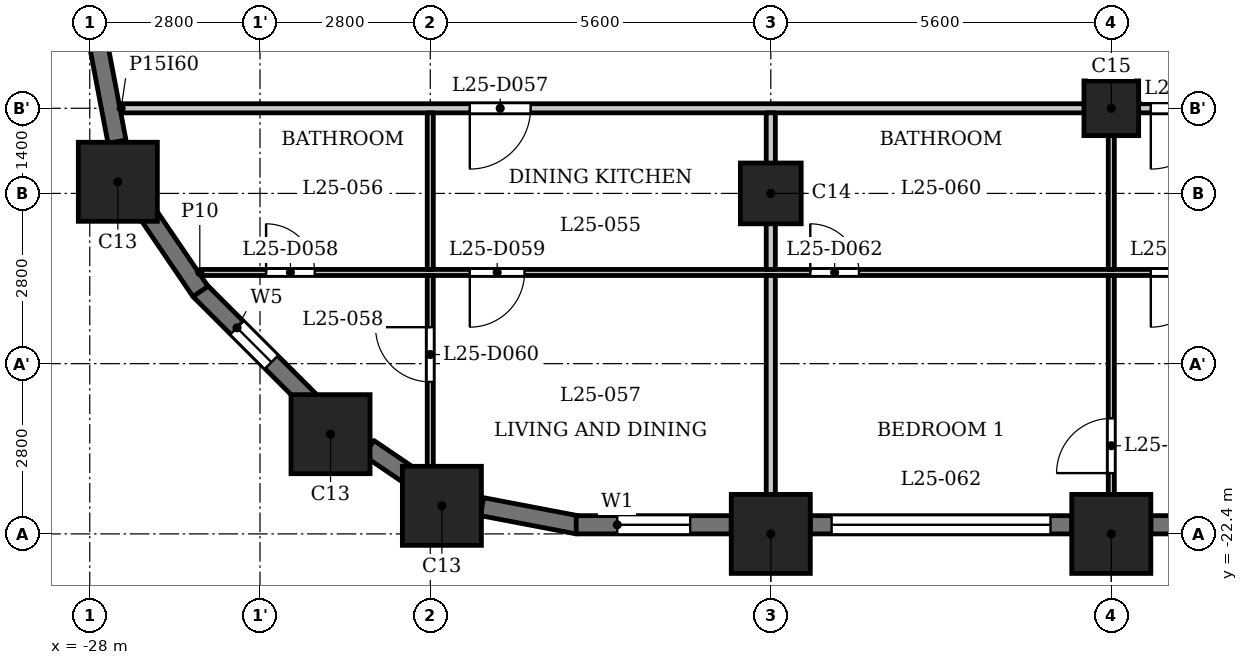
"""IFC4 building model, lengths in metres.
Left out: names, types, materials, properties, quantities, classifications, styles, units other than length and angle.
Written with IfcOpenShell. Run it as: python <this file> out.ifc"""

import sys

from ifc_helpers import new_model, si_unit, direction, frame, frame_2d, origin, origin_2d, place, context, subcontext, project, spatial, rectangle, extrude, element, fill, save


model = new_model("IFC4")
c1 = context("Model", 3, precision=1e-05, world=origin(), true_north=direction((0.0, 1.0)))
c2 = subcontext(c1, "Body", "Model", "MODEL_VIEW")
j1 = project(units=[si_unit("LENGTHUNIT", "METRE"), si_unit("PLANEANGLEUNIT", "RADIAN")], contexts=[c1])
p1 = place(None, origin())
s1 = spatial("IfcSite", under=j1, at=p1, CompositionType="ELEMENT")
p2 = place(p1, origin())
s2 = spatial("IfcBuilding", under=s1, at=p2, CompositionType="ELEMENT")
p3 = place(p2, frame((0.0, 0.0, 100.8)))
s3 = spatial("IfcBuildingStorey", under=s2, at=p3, CompositionType="ELEMENT", Elevation=100.8)
for number, where, z_axis, x_axis in (
    (1, (-22.209, -21.938, 0.0), (0.0, 0.0, 1.0), (1.0, 0.0, 0.0)),
    (2, (-16.8, -22.4, 0.0), (0.0, 0.0, 1.0), (1.0, 0.0, 0.0)),
    (3, (-11.2, -22.4, 0.0), (0.0, 0.0, 1.0), (1.0, 0.0, 0.0)),
    (4, (-27.538, -16.609, 0.0), (0.0, 0.0, 1.0), (1.0, 0.0, 0.0)),
    (5, (-24.04, -20.76, 0.0), (0.0, 0.0, 1.0), (1.0, 0.0, 0.0)),
):
    element("IfcColumn", number, at=place(p3, frame(where, z_axis=z_axis, x_axis=x_axis)), inside=s3, PredefinedType="COLUMN", context=c2, shape_type="SweptSolid", body=[
        extrude(rectangle(XDim=1.3, YDim=1.3, at=origin_2d()), origin(), (0.0, 0.0, 1.0), 3.5),
    ])
p4 = place(p3, frame((-16.8, -16.8, 0.0), z_axis=(0.0, 0.0, 1.0), x_axis=(1.0, 0.0, 0.0)))
e6 = element("IfcColumn", 6, at=p4, inside=s3, PredefinedType="COLUMN", context=c2, shape_type="SweptSolid", body=[
    extrude(rectangle(XDim=1.0, YDim=1.0, at=origin_2d()), origin(), (0.0, 0.0, 1.0), 3.5),
])
p5 = place(p3, frame((-11.2, -15.4, 0.0), z_axis=(0.0, 0.0, 1.0), x_axis=(1.0, 0.0, 0.0)))
e7 = element("IfcColumn", 7, at=p5, inside=s3, PredefinedType="COLUMN", context=c2, shape_type="SweptSolid", body=[
    extrude(rectangle(XDim=0.9, YDim=0.9, at=origin_2d()), origin(), (0.0, 0.0, 1.0), 3.5),
])
p6 = place(p3, frame((-26.197, -18.391, 0.0), z_axis=(0.0, 0.0, 1.0), x_axis=(0.707058908279, -0.707154650853, 0.0)))
e8 = element("IfcWall", 8, at=p6, inside=s3, PredefinedType="SOLIDWALL", context=c2, shape_type="SweptSolid", body=[
    extrude(rectangle(XDim=2.55, YDim=0.3, at=frame_2d((1.275, 0.0))), origin(), (0.0, 0.0, 1.0), 2.4),
])
p7 = place(p6, frame((0.875, 0.0, 0.6)))
e9 = element("IfcOpeningElement", 9, at=p7, cuts=e8, PredefinedType="OPENING", context=c2, shape_type="SweptSolid", body=[
    extrude(rectangle(XDim=0.8, YDim=1.55, at=frame_2d((0.4, 0.775))), frame((0.0, 0.16, 0.0), z_axis=(0.0, -1.0, 0.0), x_axis=(1.0, 0.0, 0.0)), (0.0, 0.0, 1.0), 0.32),
])
p8 = place(p3, frame((-23.41, -20.989, 0.0), z_axis=(0.0, 0.0, 1.0), x_axis=(0.827050703543, -0.562127328787, 0.0)))
e10 = element("IfcWall", 10, at=p8, inside=s3, PredefinedType="SOLIDWALL", context=c2, shape_type="SweptSolid", body=[
    extrude(rectangle(XDim=0.877, YDim=0.3, at=frame_2d((0.438, 0.0))), origin(), (0.0, 0.0, 1.0), 3.2),
])
p9 = place(p3, frame((-21.55, -21.952, 0.0), z_axis=(0.0, 0.0, 1.0), x_axis=(0.982278644094, -0.187426426519, 0.0)))
e11 = element("IfcWall", 11, at=p9, inside=s3, PredefinedType="SOLIDWALL", context=c2, shape_type="SweptSolid", body=[
    extrude(rectangle(XDim=1.606, YDim=0.3, at=frame_2d((0.803, 0.0))), origin(), (0.0, 0.0, 1.0), 2.4),
])
p10 = place(p3, frame((-20.0, -22.25, 0.0), z_axis=(0.0, 0.0, 1.0), x_axis=(1.0, 0.0, 0.0)))
e12 = element("IfcWall", 12, at=p10, inside=s3, PredefinedType="SOLIDWALL", context=c2, shape_type="SweptSolid", body=[
    extrude(rectangle(XDim=2.55, YDim=0.3, at=frame_2d((1.275, 0.0))), origin(), (0.0, 0.0, 1.0), 2.4),
])
p11 = place(p10, frame((0.675, 0.0, 0.6)))
e13 = element("IfcOpeningElement", 13, at=p11, cuts=e12, PredefinedType="OPENING", context=c2, shape_type="SweptSolid", body=[
    extrude(rectangle(XDim=1.2, YDim=1.55, at=frame_2d((0.6, 0.775))), frame((0.0, 0.16, 0.0), z_axis=(0.0, -1.0, 0.0), x_axis=(1.0, 0.0, 0.0)), (0.0, 0.0, 1.0), 0.32),
])
p12 = place(p3, frame((-16.15, -22.25, 0.0), z_axis=(0.0, 0.0, 1.0), x_axis=(1.0, 0.0, 0.0)))
e14 = element("IfcWall", 14, at=p12, inside=s3, PredefinedType="SOLIDWALL", context=c2, shape_type="SweptSolid", body=[
    extrude(rectangle(XDim=4.3, YDim=0.3, at=frame_2d((2.15, 0.0))), origin(), (0.0, 0.0, 1.0), 2.4),
])
p13 = place(p12, frame((0.35, 0.0, 1.2)))
e15 = element("IfcOpeningElement", 15, at=p13, cuts=e14, PredefinedType="OPENING", context=c2, shape_type="SweptSolid", body=[
    extrude(rectangle(XDim=3.6, YDim=0.95, at=frame_2d((1.8, 0.475))), frame((0.0, 0.16, 0.0), z_axis=(0.0, -1.0, 0.0), x_axis=(1.0, 0.0, 0.0)), (0.0, 0.0, 1.0), 0.32),
])
p14 = place(p3, frame((-10.55, -22.25, 0.0), z_axis=(0.0, 0.0, 1.0), x_axis=(1.0, 0.0, 0.0)))
e16 = element("IfcWall", 16, at=p14, inside=s3, PredefinedType="SOLIDWALL", context=c2, shape_type="SweptSolid", body=[
    extrude(rectangle(XDim=4.3, YDim=0.3, at=frame_2d((2.15, 0.0))), origin(), (0.0, 0.0, 1.0), 2.4),
])
p15 = place(p14, frame((0.35, 0.0, 1.2)))
e17 = element("IfcOpeningElement", 17, at=p15, cuts=e16, PredefinedType="OPENING", context=c2, shape_type="SweptSolid", body=[
    extrude(rectangle(XDim=3.6, YDim=0.95, at=frame_2d((1.8, 0.475))), frame((0.0, 0.16, 0.0), z_axis=(0.0, -1.0, 0.0), x_axis=(1.0, 0.0, 0.0)), (0.0, 0.0, 1.0), 0.32),
])
for number, where, z_axis, x_axis in (
    (18, (-27.853, -14.372, 0.0), (0.0, 0.0, 1.0), (0.187, -0.982, 0.0)),
    (19, (-27.082, -17.084, 0.0), (0.0, 0.0, 1.0), (0.562, -0.827, 0.0)),
):
    element("IfcWall", number, at=place(p3, frame(where, z_axis=z_axis, x_axis=x_axis)), inside=s3, PredefinedType="SOLIDWALL", context=c2, shape_type="SweptSolid", body=[
        extrude(rectangle(XDim=1.606, YDim=0.3, at=frame_2d((0.803, 0.0))), origin(), (0.0, 0.0, 1.0), 2.4),
    ])
p16 = place(p3, frame((-26.19, -18.1, 0.0), z_axis=(0.0, 0.0, 1.0), x_axis=(1.0, 0.0, 0.0)))
e20 = element("IfcWall", 20, at=p16, inside=s3, PredefinedType="PARTITIONING", context=c2, shape_type="SweptSolid", body=[
    extrude(rectangle(XDim=52.63, YDim=0.1, at=frame_2d((26.315, 0.0))), origin(), (0.0, 0.0, 1.0), 3.2),
])
p17 = place(p16, frame((1.09, 0.0, 0.0)))
e21 = element("IfcOpeningElement", 21, at=p17, cuts=e20, PredefinedType="OPENING", context=c2, shape_type="SweptSolid", body=[
    extrude(rectangle(XDim=0.8, YDim=2.1, at=frame_2d((0.4, 1.05))), frame((0.0, 0.06, 0.0), z_axis=(0.0, -1.0, 0.0), x_axis=(1.0, 0.0, 0.0)), (0.0, 0.0, 1.0), 0.12),
])
p18 = place(p16, frame((4.44, 0.0, 0.0)))
e22 = element("IfcOpeningElement", 22, at=p18, cuts=e20, PredefinedType="OPENING", context=c2, shape_type="SweptSolid", body=[
    extrude(rectangle(XDim=0.9, YDim=2.1, at=frame_2d((0.45, 1.05))), frame((0.0, 0.06, 0.0), z_axis=(0.0, -1.0, 0.0), x_axis=(1.0, 0.0, 0.0)), (0.0, 0.0, 1.0), 0.12),
])
p19 = place(p16, frame((10.04, 0.0, 0.0)))
e23 = element("IfcOpeningElement", 23, at=p19, cuts=e20, PredefinedType="OPENING", context=c2, shape_type="SweptSolid", body=[
    extrude(rectangle(XDim=0.8, YDim=2.1, at=frame_2d((0.4, 1.05))), frame((0.0, 0.06, 0.0), z_axis=(0.0, -1.0, 0.0), x_axis=(1.0, 0.0, 0.0)), (0.0, 0.0, 1.0), 0.12),
])
p20 = place(p16, frame((15.64, 0.0, 0.0)))
e24 = element("IfcOpeningElement", 24, at=p20, cuts=e20, PredefinedType="OPENING", context=c2, shape_type="SweptSolid", body=[
    extrude(rectangle(XDim=0.9, YDim=2.1, at=frame_2d((0.45, 1.05))), frame((0.0, 0.06, 0.0), z_axis=(0.0, -1.0, 0.0), x_axis=(1.0, 0.0, 0.0)), (0.0, 0.0, 1.0), 0.12),
])
p21 = place(p16, frame((24.74, 0.0, 0.0)))
e25 = element("IfcOpeningElement", 25, at=p21, cuts=e20, PredefinedType="OPENING", context=c2, shape_type="SweptSolid", body=[
    extrude(rectangle(XDim=0.8, YDim=2.1, at=frame_2d((0.4, 1.05))), frame((0.0, 0.06, 0.0), z_axis=(0.0, -1.0, 0.0), x_axis=(1.0, 0.0, 0.0)), (0.0, 0.0, 1.0), 0.12),
])
p22 = place(p16, frame((21.24, 0.0, 0.0)))
e26 = element("IfcOpeningElement", 26, at=p22, cuts=e20, PredefinedType="OPENING", context=c2, shape_type="SweptSolid", body=[
    extrude(rectangle(XDim=0.9, YDim=2.1, at=frame_2d((0.45, 1.05))), frame((0.0, 0.06, 0.0), z_axis=(0.0, -1.0, 0.0), x_axis=(1.0, 0.0, 0.0)), (0.0, 0.0, 1.0), 0.12),
])
p23 = place(p16, frame((35.94, 0.0, 0.0)))
e27 = element("IfcOpeningElement", 27, at=p23, cuts=e20, PredefinedType="OPENING", context=c2, shape_type="SweptSolid", body=[
    extrude(rectangle(XDim=0.8, YDim=2.1, at=frame_2d((0.4, 1.05))), frame((0.0, 0.06, 0.0), z_axis=(0.0, -1.0, 0.0), x_axis=(1.0, 0.0, 0.0)), (0.0, 0.0, 1.0), 0.12),
])
p24 = place(p16, frame((33.19, 0.0, 0.0)))
e28 = element("IfcOpeningElement", 28, at=p24, cuts=e20, PredefinedType="OPENING", context=c2, shape_type="SweptSolid", body=[
    extrude(rectangle(XDim=0.9, YDim=2.1, at=frame_2d((0.45, 1.05))), frame((0.0, 0.06, 0.0), z_axis=(0.0, -1.0, 0.0), x_axis=(1.0, 0.0, 0.0)), (0.0, 0.0, 1.0), 0.12),
])
p25 = place(p16, frame((27.59, 0.0, 0.0)))
e29 = element("IfcOpeningElement", 29, at=p25, cuts=e20, PredefinedType="OPENING", context=c2, shape_type="SweptSolid", body=[
    extrude(rectangle(XDim=0.9, YDim=2.1, at=frame_2d((0.45, 1.05))), frame((0.0, 0.06, 0.0), z_axis=(0.0, -1.0, 0.0), x_axis=(1.0, 0.0, 0.0)), (0.0, 0.0, 1.0), 0.12),
])
p26 = place(p16, frame((29.64, 0.0, 0.0)))
e30 = element("IfcOpeningElement", 30, at=p26, cuts=e20, PredefinedType="OPENING", context=c2, shape_type="SweptSolid", body=[
    extrude(rectangle(XDim=0.9, YDim=2.1, at=frame_2d((0.45, 1.05))), frame((0.0, 0.06, 0.0), z_axis=(0.0, -1.0, 0.0), x_axis=(1.0, 0.0, 0.0)), (0.0, 0.0, 1.0), 0.12),
])
p27 = place(p16, frame((41.54, 0.0, 0.0)))
e31 = element("IfcOpeningElement", 31, at=p27, cuts=e20, PredefinedType="OPENING", context=c2, shape_type="SweptSolid", body=[
    extrude(rectangle(XDim=0.8, YDim=2.1, at=frame_2d((0.4, 1.05))), frame((0.0, 0.06, 0.0), z_axis=(0.0, -1.0, 0.0), x_axis=(1.0, 0.0, 0.0)), (0.0, 0.0, 1.0), 0.12),
])
p28 = place(p16, frame((38.54, 0.0, 0.0)))
e32 = element("IfcOpeningElement", 32, at=p28, cuts=e20, PredefinedType="OPENING", context=c2, shape_type="SweptSolid", body=[
    extrude(rectangle(XDim=0.9, YDim=2.1, at=frame_2d((0.45, 1.05))), frame((0.0, 0.06, 0.0), z_axis=(0.0, -1.0, 0.0), x_axis=(1.0, 0.0, 0.0)), (0.0, 0.0, 1.0), 0.12),
])
p29 = place(p16, frame((49.204, 0.0, 0.0)))
e33 = element("IfcOpeningElement", 33, at=p29, cuts=e20, PredefinedType="OPENING", context=c2, shape_type="SweptSolid", body=[
    extrude(rectangle(XDim=0.8, YDim=2.1, at=frame_2d((0.4, 1.05))), frame((0.0, 0.06, 0.0), z_axis=(0.0, -1.0, 0.0), x_axis=(1.0, 0.0, 0.0)), (0.0, 0.0, 1.0), 0.12),
])
p30 = place(p16, frame((43.64, 0.0, 0.0)))
e34 = element("IfcOpeningElement", 34, at=p30, cuts=e20, PredefinedType="OPENING", context=c2, shape_type="SweptSolid", body=[
    extrude(rectangle(XDim=0.9, YDim=2.1, at=frame_2d((0.45, 1.05))), frame((0.0, 0.06, 0.0), z_axis=(0.0, -1.0, 0.0), x_axis=(1.0, 0.0, 0.0)), (0.0, 0.0, 1.0), 0.12),
])
p31 = place(p3, frame((-27.484, -15.4, 0.0), z_axis=(0.0, 0.0, 1.0), x_axis=(1.0, 0.0, 0.0)))
e35 = element("IfcWall", 35, at=p31, inside=s3, PredefinedType="PARTITIONING", context=c2, shape_type="SweptSolid", body=[
    extrude(rectangle(XDim=54.968, YDim=0.15, at=frame_2d((27.484, 0.0))), origin(), (0.0, 0.0, 1.0), 3.2),
])
p32 = place(p31, frame((5.734, 0.0, 0.0)))
e36 = element("IfcOpeningElement", 36, at=p32, cuts=e35, PredefinedType="OPENING", context=c2, shape_type="SweptSolid", body=[
    extrude(rectangle(XDim=1.0, YDim=2.1, at=frame_2d((0.5, 1.05))), frame((0.0, 0.085, 0.0), z_axis=(0.0, -1.0, 0.0), x_axis=(1.0, 0.0, 0.0)), (0.0, 0.0, 1.0), 0.17),
])
p33 = place(p31, frame((16.934, 0.0, 0.0)))
e37 = element("IfcOpeningElement", 37, at=p33, cuts=e35, PredefinedType="OPENING", context=c2, shape_type="SweptSolid", body=[
    extrude(rectangle(XDim=1.0, YDim=2.1, at=frame_2d((0.5, 1.05))), frame((0.0, 0.085, 0.0), z_axis=(0.0, -1.0, 0.0), x_axis=(1.0, 0.0, 0.0)), (0.0, 0.0, 1.0), 0.17),
])
p34 = place(p31, frame((22.534, 0.0, 0.0)))
e38 = element("IfcOpeningElement", 38, at=p34, cuts=e35, PredefinedType="OPENING", context=c2, shape_type="SweptSolid", body=[
    extrude(rectangle(XDim=1.0, YDim=2.1, at=frame_2d((0.5, 1.05))), frame((0.0, 0.085, 0.0), z_axis=(0.0, -1.0, 0.0), x_axis=(1.0, 0.0, 0.0)), (0.0, 0.0, 1.0), 0.17),
])
p35 = place(p31, frame((31.384, 0.0, 0.0)))
e39 = element("IfcOpeningElement", 39, at=p35, cuts=e35, PredefinedType="OPENING", context=c2, shape_type="SweptSolid", body=[
    extrude(rectangle(XDim=1.0, YDim=2.1, at=frame_2d((0.5, 1.05))), frame((0.0, 0.085, 0.0), z_axis=(0.0, -1.0, 0.0), x_axis=(1.0, 0.0, 0.0)), (0.0, 0.0, 1.0), 0.17),
])
p36 = place(p31, frame((39.584, 0.0, 0.0)))
e40 = element("IfcOpeningElement", 40, at=p36, cuts=e35, PredefinedType="OPENING", context=c2, shape_type="SweptSolid", body=[
    extrude(rectangle(XDim=1.0, YDim=2.1, at=frame_2d((0.5, 1.05))), frame((0.0, 0.085, 0.0), z_axis=(0.0, -1.0, 0.0), x_axis=(1.0, 0.0, 0.0)), (0.0, 0.0, 1.0), 0.17),
])
p37 = place(p31, frame((44.934, 0.0, 0.0)))
e41 = element("IfcOpeningElement", 41, at=p37, cuts=e35, PredefinedType="OPENING", context=c2, shape_type="SweptSolid", body=[
    extrude(rectangle(XDim=1.0, YDim=2.1, at=frame_2d((0.5, 1.05))), frame((0.0, 0.085, 0.0), z_axis=(0.0, -1.0, 0.0), x_axis=(1.0, 0.0, 0.0)), (0.0, 0.0, 1.0), 0.17),
])
p38 = place(p3, frame((-22.4, -21.72, 0.0), z_axis=(0.0, 0.0, 1.0), x_axis=(0.0, 1.0, 0.0)))
e42 = element("IfcWall", 42, at=p38, inside=s3, PredefinedType="PARTITIONING", context=c2, shape_type="SweptSolid", body=[
    extrude(rectangle(XDim=3.57, YDim=0.1, at=frame_2d((1.785, 0.0))), origin(), (0.0, 0.0, 1.0), 3.2),
])
p39 = place(p38, frame((1.82, 0.0, 0.0)))
e43 = element("IfcOpeningElement", 43, at=p39, cuts=e42, PredefinedType="OPENING", context=c2, shape_type="SweptSolid", body=[
    extrude(rectangle(XDim=0.9, YDim=2.1, at=frame_2d((0.45, 1.05))), frame((0.0, 0.06, 0.0), z_axis=(0.0, -1.0, 0.0), x_axis=(1.0, 0.0, 0.0)), (0.0, 0.0, 1.0), 0.12),
])
p40 = place(p3, frame((-22.4, -18.05, 0.0), z_axis=(0.0, 0.0, 1.0), x_axis=(0.0, 1.0, 0.0)))
e44 = element("IfcWall", 44, at=p40, inside=s3, PredefinedType="PARTITIONING", context=c2, shape_type="SweptSolid", body=[
    extrude(rectangle(XDim=2.575, YDim=0.1, at=frame_2d((1.288, 0.0))), origin(), (0.0, 0.0, 1.0), 3.2),
])
p41 = place(p3, frame((-16.8, -23.03, 0.0), z_axis=(0.0, 0.0, 1.0), x_axis=(0.0, 1.0, 0.0)))
e45 = element("IfcWall", 45, at=p41, inside=s3, PredefinedType="PARTITIONING", context=c2, shape_type="SweptSolid", body=[
    extrude(rectangle(XDim=4.88, YDim=0.15, at=frame_2d((2.44, 0.0))), origin(), (0.0, 0.0, 1.0), 3.2),
])
p42 = place(p3, frame((-16.8, -18.05, 0.0), z_axis=(0.0, 0.0, 1.0), x_axis=(0.0, 1.0, 0.0)))
e46 = element("IfcWall", 46, at=p42, inside=s3, PredefinedType="PARTITIONING", context=c2, shape_type="SweptSolid", body=[
    extrude(rectangle(XDim=2.575, YDim=0.15, at=frame_2d((1.288, 0.0))), origin(), (0.0, 0.0, 1.0), 3.2),
])
p43 = place(p3, frame((-11.2, -23.03, 0.0), z_axis=(0.0, 0.0, 1.0), x_axis=(0.0, 1.0, 0.0)))
e47 = element("IfcWall", 47, at=p43, inside=s3, PredefinedType="PARTITIONING", context=c2, shape_type="SweptSolid", body=[
    extrude(rectangle(XDim=4.88, YDim=0.1, at=frame_2d((2.44, 0.0))), origin(), (0.0, 0.0, 1.0), 3.2),
])
p44 = place(p43, frame((1.63, 0.0, 0.0)))
e48 = element("IfcOpeningElement", 48, at=p44, cuts=e47, PredefinedType="OPENING", context=c2, shape_type="SweptSolid", body=[
    extrude(rectangle(XDim=0.9, YDim=2.1, at=frame_2d((0.45, 1.05))), frame((0.0, 0.06, 0.0), z_axis=(0.0, -1.0, 0.0), x_axis=(1.0, 0.0, 0.0)), (0.0, 0.0, 1.0), 0.12),
])
p45 = place(p3, frame((-11.2, -18.05, 0.0), z_axis=(0.0, 0.0, 1.0), x_axis=(0.0, 1.0, 0.0)))
e49 = element("IfcWall", 49, at=p45, inside=s3, PredefinedType="PARTITIONING", context=c2, shape_type="SweptSolid", body=[
    extrude(rectangle(XDim=2.575, YDim=0.1, at=frame_2d((1.288, 0.0))), origin(), (0.0, 0.0, 1.0), 3.2),
])
p46 = place(p32, origin())
e50 = element("IfcDoor", 50, at=p46, inside=s3, OperationType="SINGLE_SWING_LEFT", PredefinedType="DOOR", context=c2, shape_type="SweptSolid", body=[
    extrude(rectangle(XDim=1.0, YDim=2.1, at=frame_2d((0.5, 1.05))), frame((0.0, 0.025, 0.0), z_axis=(0.0, -1.0, 0.0), x_axis=(1.0, 0.0, 0.0)), (0.0, 0.0, 1.0), 0.05),
])
fill(e36, e50)
p47 = place(p17, origin())
e51 = element("IfcDoor", 51, at=p47, inside=s3, OperationType="SINGLE_SWING_RIGHT", PredefinedType="DOOR", context=c2, shape_type="SweptSolid", body=[
    extrude(rectangle(XDim=0.8, YDim=2.1, at=frame_2d((0.4, 1.05))), frame((0.0, 0.025, 0.0), z_axis=(0.0, -1.0, 0.0), x_axis=(1.0, 0.0, 0.0)), (0.0, 0.0, 1.0), 0.05),
])
fill(e21, e51)
p48 = place(p18, origin())
e52 = element("IfcDoor", 52, at=p48, inside=s3, OperationType="SINGLE_SWING_LEFT", PredefinedType="DOOR", context=c2, shape_type="SweptSolid", body=[
    extrude(rectangle(XDim=0.9, YDim=2.1, at=frame_2d((0.45, 1.05))), frame((0.0, 0.025, 0.0), z_axis=(0.0, -1.0, 0.0), x_axis=(1.0, 0.0, 0.0)), (0.0, 0.0, 1.0), 0.05),
])
fill(e22, e52)
p49 = place(p39, origin())
e53 = element("IfcDoor", 53, at=p49, inside=s3, OperationType="SINGLE_SWING_LEFT", PredefinedType="DOOR", context=c2, shape_type="SweptSolid", body=[
    extrude(rectangle(XDim=0.9, YDim=2.1, at=frame_2d((0.45, 1.05))), frame((0.0, 0.025, 0.0), z_axis=(0.0, -1.0, 0.0), x_axis=(1.0, 0.0, 0.0)), (0.0, 0.0, 1.0), 0.05),
])
fill(e43, e53)
p50 = place(p33, origin())
e54 = element("IfcDoor", 54, at=p50, inside=s3, OperationType="SINGLE_SWING_LEFT", PredefinedType="DOOR", context=c2, shape_type="SweptSolid", body=[
    extrude(rectangle(XDim=1.0, YDim=2.1, at=frame_2d((0.5, 1.05))), frame((0.0, 0.025, 0.0), z_axis=(0.0, -1.0, 0.0), x_axis=(1.0, 0.0, 0.0)), (0.0, 0.0, 1.0), 0.05),
])
fill(e37, e54)
p51 = place(p19, origin())
e55 = element("IfcDoor", 55, at=p51, inside=s3, OperationType="SINGLE_SWING_RIGHT", PredefinedType="DOOR", context=c2, shape_type="SweptSolid", body=[
    extrude(rectangle(XDim=0.8, YDim=2.1, at=frame_2d((0.4, 1.05))), frame((0.0, 0.025, 0.0), z_axis=(0.0, -1.0, 0.0), x_axis=(1.0, 0.0, 0.0)), (0.0, 0.0, 1.0), 0.05),
])
fill(e23, e55)
p52 = place(p20, origin())
e56 = element("IfcDoor", 56, at=p52, inside=s3, OperationType="SINGLE_SWING_LEFT", PredefinedType="DOOR", context=c2, shape_type="SweptSolid", body=[
    extrude(rectangle(XDim=0.9, YDim=2.1, at=frame_2d((0.45, 1.05))), frame((0.0, 0.025, 0.0), z_axis=(0.0, -1.0, 0.0), x_axis=(1.0, 0.0, 0.0)), (0.0, 0.0, 1.0), 0.05),
])
fill(e24, e56)
p53 = place(p44, origin())
e57 = element("IfcDoor", 57, at=p53, inside=s3, OperationType="SINGLE_SWING_RIGHT", PredefinedType="DOOR", context=c2, shape_type="SweptSolid", body=[
    extrude(rectangle(XDim=0.9, YDim=2.1, at=frame_2d((0.45, 1.05))), frame((0.0, 0.025, 0.0), z_axis=(0.0, -1.0, 0.0), x_axis=(1.0, 0.0, 0.0)), (0.0, 0.0, 1.0), 0.05),
])
fill(e48, e57)
p54 = place(p7, origin())
e58 = element("IfcWindow", 58, at=p54, inside=s3, PartitioningType="SINGLE_PANEL", PredefinedType="WINDOW", context=c2, shape_type="SweptSolid", body=[
    extrude(rectangle(XDim=0.8, YDim=1.55, at=frame_2d((0.4, 0.775))), frame((0.0, 0.03, 0.0), z_axis=(0.0, -1.0, 0.0), x_axis=(1.0, 0.0, 0.0)), (0.0, 0.0, 1.0), 0.06),
])
fill(e9, e58)
p55 = place(p11, origin())
e59 = element("IfcWindow", 59, at=p55, inside=s3, PartitioningType="SINGLE_PANEL", PredefinedType="WINDOW", context=c2, shape_type="SweptSolid", body=[
    extrude(rectangle(XDim=1.2, YDim=1.55, at=frame_2d((0.6, 0.775))), frame((0.0, 0.03, 0.0), z_axis=(0.0, -1.0, 0.0), x_axis=(1.0, 0.0, 0.0)), (0.0, 0.0, 1.0), 0.06),
])
fill(e13, e59)
p56 = place(p13, origin())
e60 = element("IfcWindow", 60, at=p56, inside=s3, PartitioningType="SINGLE_PANEL", PredefinedType="WINDOW", context=c2, shape_type="SweptSolid", body=[
    extrude(rectangle(XDim=3.6, YDim=0.95, at=frame_2d((1.8, 0.475))), frame((0.0, 0.03, 0.0), z_axis=(0.0, -1.0, 0.0), x_axis=(1.0, 0.0, 0.0)), (0.0, 0.0, 1.0), 0.06),
])
fill(e15, e60)
save(model, sys.argv[1])
